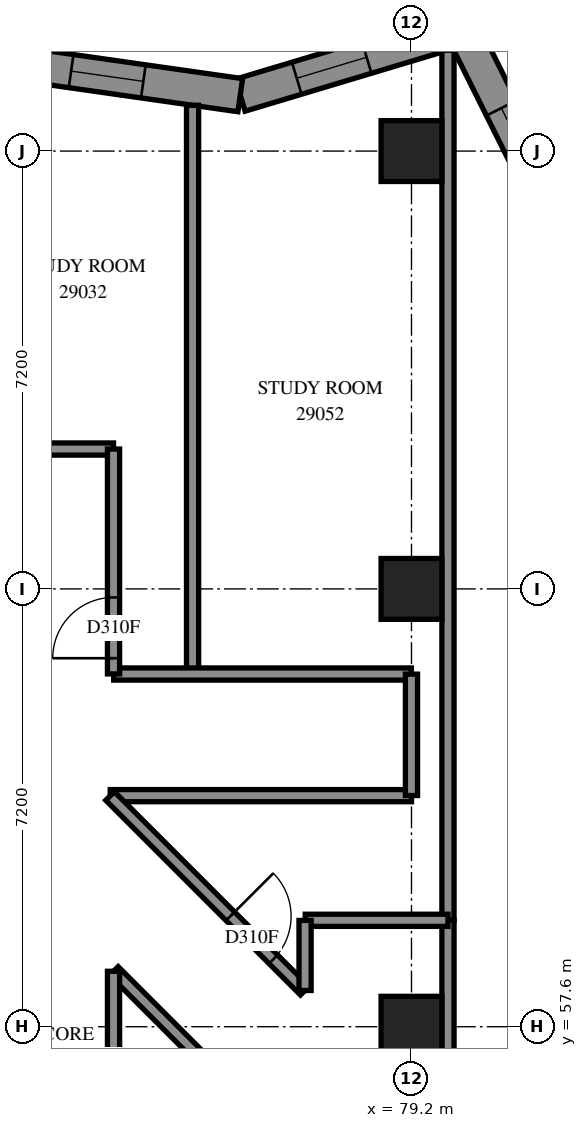
"""IFC4 building model, lengths in metres.
Left out: names, types, materials, properties, quantities, classifications, styles, units other than length and angle.
Written with IfcOpenShell. Run it as: python <this file> out.ifc"""

import sys

from ifc_helpers import new_model, si_unit, direction, frame, frame_2d, origin, origin_2d, place, context, subcontext, project, spatial, polyline, rectangle, outline, extrude, element, fill, save


model = new_model("IFC4")
c1 = context("Model", 3, precision=1e-05, world=origin(), true_north=direction((0.0, 1.0)))
c2 = subcontext(c1, "Body", "Model", "MODEL_VIEW")
j1 = project(units=[si_unit("LENGTHUNIT", "METRE"), si_unit("PLANEANGLEUNIT", "RADIAN")], contexts=[c1])
p1 = place(None, origin())
s1 = spatial("IfcSite", under=j1, at=p1, CompositionType="ELEMENT")
p2 = place(p1, origin())
s2 = spatial("IfcBuilding", under=s1, at=p2, CompositionType="ELEMENT")
p3 = place(p2, frame((0.0, 0.0, 108.4)))
s3 = spatial("IfcBuildingStorey", under=s2, at=p3, CompositionType="ELEMENT", Elevation=108.4)
for number, where, z_axis, x_axis in (
    (1, (79.2, 57.6, 0.0), (0.0, 0.0, 1.0), (1.0, 0.0, 0.0)),
    (2, (79.2, 64.8, 0.0), (0.0, 0.0, 1.0), (1.0, 0.0, 0.0)),
    (3, (79.2, 72.0, 0.0), (0.0, 0.0, 1.0), (1.0, 0.0, 0.0)),
):
    element("IfcColumn", number, at=place(p3, frame(where, z_axis=z_axis, x_axis=x_axis)), inside=s3, PredefinedType="COLUMN", context=c2, shape_type="SweptSolid", body=[
        extrude(rectangle(XDim=1.0, YDim=1.0, at=origin_2d()), origin(), (0.0, 0.0, 1.0), 3.1),
    ])
p4 = place(p3, frame((76.372, 49.373, -0.3), z_axis=(0.0, 0.0, 1.0), x_axis=(0.7071067812, 0.7071067812, 0.0)))
e4 = element("IfcWall", 4, at=p4, inside=s3, PredefinedType="SHEAR", context=c2, shape_type="SweptSolid", body=[
    extrude(rectangle(XDim=14.4, YDim=0.8, at=frame_2d((7.2, 0.0))), origin(), (0.0, 0.0, 1.0), 2.7),
])
p5 = place(p4, frame((4.55, 0.0, 0.3)))
e5 = element("IfcOpeningElement", 5, at=p5, cuts=e4, PredefinedType="OPENING", context=c2, shape_type="SweptSolid", body=[
    extrude(rectangle(XDim=1.1, YDim=2.1, at=frame_2d((0.55, 1.05))), frame((0.0, 0.41, 0.0), z_axis=(0.0, -1.0, 0.0), x_axis=(1.0, 0.0, 0.0)), (0.0, 0.0, 1.0), 0.82),
])
p6 = place(p4, frame((11.35, 0.0, 0.3)))
e6 = element("IfcOpeningElement", 6, at=p6, cuts=e4, PredefinedType="OPENING", context=c2, shape_type="SweptSolid", body=[
    extrude(rectangle(XDim=1.1, YDim=2.1, at=frame_2d((0.55, 1.05))), frame((0.0, 0.41, 0.0), z_axis=(0.0, -1.0, 0.0), x_axis=(1.0, 0.0, 0.0)), (0.0, 0.0, 1.0), 0.82),
])
p7 = place(p3, frame((81.559, 70.939, 0.0), z_axis=(0.0, 0.0, 1.0), x_axis=(-0.4461299754, 0.894968181, 0.0)))
e7 = element("IfcWall", 7, at=p7, inside=s3, PredefinedType="SOLIDWALL", context=c2, shape_type="SweptSolid", body=[
    extrude(outline(polyline([(0.067, -0.275), (3.666, -0.275), (3.202, 0.275), (-0.067, 0.275), (0.067, -0.275)])), origin(), (0.0, 0.0, 1.0), 3.1),
])
p8 = place(p7, frame((0.775, 0.0, 0.5)))
e8 = element("IfcOpeningElement", 8, at=p8, cuts=e7, PredefinedType="OPENING", context=c2, shape_type="SweptSolid", body=[
    extrude(rectangle(XDim=1.2, YDim=2.45, at=frame_2d((0.6, 1.225))), frame((0.0, 0.285, 0.0), z_axis=(0.0, -1.0, 0.0), x_axis=(1.0, 0.0, 0.0)), (0.0, 0.0, 1.0), 0.57),
])
p9 = place(p3, frame((80.027, 74.012, 0.0), z_axis=(0.0, 0.0, 1.0), x_axis=(-0.9578284561, -0.2873406493, 0.0)))
e9 = element("IfcWall", 9, at=p9, inside=s3, PredefinedType="SOLIDWALL", context=c2, shape_type="SweptSolid", body=[
    extrude(outline(polyline([(-0.232, -0.275), (3.743, -0.275), (3.864, 0.275), (0.232, 0.275), (-0.232, -0.275)])), origin(), (0.0, 0.0, 1.0), 3.1),
])
p10 = place(p9, frame((1.634, 0.0, 0.5)))
e10 = element("IfcOpeningElement", 10, at=p10, cuts=e9, PredefinedType="OPENING", context=c2, shape_type="SweptSolid", body=[
    extrude(rectangle(XDim=1.2, YDim=2.45, at=frame_2d((0.6, 1.225))), frame((0.0, 0.285, 0.0), z_axis=(0.0, -1.0, 0.0), x_axis=(1.0, 0.0, 0.0)), (0.0, 0.0, 1.0), 0.57),
])
p11 = place(p3, frame((76.384, 72.919, 0.0), z_axis=(0.0, 0.0, 1.0), x_axis=(-0.9900171381, 0.1409470338, 0.0)))
e11 = element("IfcWall", 11, at=p11, inside=s3, PredefinedType="SOLIDWALL", context=c2, shape_type="SweptSolid", body=[
    extrude(outline(polyline([(0.06, -0.275), (3.906, -0.275), (3.828, 0.275), (-0.06, 0.275), (0.06, -0.275)])), origin(), (0.0, 0.0, 1.0), 3.1),
])
p12 = place(p11, frame((1.61, 0.0, 0.5)))
e12 = element("IfcOpeningElement", 12, at=p12, cuts=e11, PredefinedType="OPENING", context=c2, shape_type="SweptSolid", body=[
    extrude(rectangle(XDim=1.2, YDim=2.45, at=frame_2d((0.6, 1.225))), frame((0.0, 0.285, 0.0), z_axis=(0.0, -1.0, 0.0), x_axis=(1.0, 0.0, 0.0)), (0.0, 0.0, 1.0), 0.57),
])
p13 = place(p3, frame((55.3, 67.1, 0.0), z_axis=(0.0, 0.0, 1.0), x_axis=(1.0, 0.0, 0.0)))
e13 = element("IfcWall", 13, at=p13, inside=s3, PredefinedType="PARTITIONING", context=c2, shape_type="SweptSolid", body=[
    extrude(rectangle(XDim=19.0, YDim=0.2, at=frame_2d((9.5, 0.0))), origin(), (0.0, 0.0, 1.0), 3.1),
])
p14 = place(p13, frame((6.199, 0.0, 0.0)))
e14 = element("IfcOpeningElement", 14, at=p14, cuts=e13, PredefinedType="OPENING", context=c2, shape_type="SweptSolid", body=[
    extrude(rectangle(XDim=0.9, YDim=2.1, at=frame_2d((0.45, 1.05))), frame((0.0, 0.11, 0.0), z_axis=(0.0, -1.0, 0.0), x_axis=(1.0, 0.0, 0.0)), (0.0, 0.0, 1.0), 0.22),
])
p15 = place(p13, frame((13.399, 0.0, 0.0)))
e15 = element("IfcOpeningElement", 15, at=p15, cuts=e13, PredefinedType="OPENING", context=c2, shape_type="SweptSolid", body=[
    extrude(rectangle(XDim=0.9, YDim=2.1, at=frame_2d((0.45, 1.05))), frame((0.0, 0.11, 0.0), z_axis=(0.0, -1.0, 0.0), x_axis=(1.0, 0.0, 0.0)), (0.0, 0.0, 1.0), 0.22),
])
p16 = place(p3, frame((79.8, 59.35, 0.0), z_axis=(0.0, 0.0, 1.0), x_axis=(0.0, 1.0, 0.0)))
e16 = element("IfcWall", 16, at=p16, inside=s3, PredefinedType="PARTITIONING", context=c2, shape_type="SweptSolid", body=[
    extrude(rectangle(XDim=14.307, YDim=0.2, at=frame_2d((7.153, 0.0))), origin(), (0.0, 0.0, 1.0), 3.1),
])
p17 = place(p3, frame((75.6, 63.4, 0.0), z_axis=(0.0, 0.0, 1.0), x_axis=(0.0, 1.0, 0.0)))
e17 = element("IfcWall", 17, at=p17, inside=s3, PredefinedType="PARTITIONING", context=c2, shape_type="SweptSolid", body=[
    extrude(rectangle(XDim=9.353, YDim=0.2, at=frame_2d((4.676, 0.0))), origin(), (0.0, 0.0, 1.0), 3.1),
])
p18 = place(p3, frame((74.246, 61.4, 0.0), z_axis=(0.0, 0.0, 1.0), x_axis=(1.0, 0.0, 0.0)))
e18 = element("IfcWall", 18, at=p18, inside=s3, PredefinedType="PARTITIONING", context=c2, shape_type="SweptSolid", body=[
    extrude(rectangle(XDim=4.954, YDim=0.2, at=frame_2d((2.477, 0.0))), origin(), (0.0, 0.0, 1.0), 3.1),
])
p19 = place(p3, frame((74.302, 63.4, 0.0), z_axis=(0.0, 0.0, 1.0), x_axis=(1.0, 0.0, 0.0)))
e19 = element("IfcWall", 19, at=p19, inside=s3, PredefinedType="PARTITIONING", context=c2, shape_type="SweptSolid", body=[
    extrude(rectangle(XDim=4.896, YDim=0.2, at=frame_2d((2.448, 0.0))), origin(), (0.0, 0.0, 1.0), 3.1),
])
p20 = place(p3, frame((74.243, 61.395, 0.0), z_axis=(0.0, 0.0, 1.0), x_axis=(0.7071067812, -0.7071067812, 0.0)))
e20 = element("IfcWall", 20, at=p20, inside=s3, PredefinedType="PARTITIONING", context=c2, shape_type="SweptSolid", body=[
    extrude(rectangle(XDim=4.528, YDim=0.2, at=frame_2d((2.264, 0.0))), origin(), (0.0, 0.0, 1.0), 3.1),
])
p21 = place(p20, frame((2.797, 0.0, 0.0)))
e21 = element("IfcOpeningElement", 21, at=p21, cuts=e20, PredefinedType="OPENING", context=c2, shape_type="SweptSolid", body=[
    extrude(rectangle(XDim=1.0, YDim=2.1, at=frame_2d((0.5, 1.05))), frame((0.0, 0.11, 0.0), z_axis=(0.0, -1.0, 0.0), x_axis=(1.0, 0.0, 0.0)), (0.0, 0.0, 1.0), 0.22),
])
p22 = place(p3, frame((74.3, 63.402, 0.0), z_axis=(0.0, 0.0, 1.0), x_axis=(0.0, 1.0, 0.0)))
e22 = element("IfcWall", 22, at=p22, inside=s3, PredefinedType="PARTITIONING", context=c2, shape_type="SweptSolid", body=[
    extrude(rectangle(XDim=3.698, YDim=0.2, at=frame_2d((1.849, 0.0))), origin(), (0.0, 0.0, 1.0), 3.1),
])
p23 = place(p22, frame((0.258, 0.0, 0.0)))
e23 = element("IfcOpeningElement", 23, at=p23, cuts=e22, PredefinedType="OPENING", context=c2, shape_type="SweptSolid", body=[
    extrude(rectangle(XDim=1.0, YDim=2.1, at=frame_2d((0.5, 1.05))), frame((0.0, 0.11, 0.0), z_axis=(0.0, -1.0, 0.0), x_axis=(1.0, 0.0, 0.0)), (0.0, 0.0, 1.0), 0.22),
])
p24 = place(p3, frame((79.8, 55.85, 0.0), z_axis=(0.0, 0.0, 1.0), x_axis=(0.0, 1.0, 0.0)))
e24 = element("IfcWall", 24, at=p24, inside=s3, PredefinedType="PARTITIONING", context=c2, shape_type="SweptSolid", body=[
    extrude(rectangle(XDim=3.5, YDim=0.2, at=frame_2d((1.75, 0.0))), origin(), (0.0, 0.0, 1.0), 3.1),
])
p25 = place(p3, frame((74.305, 58.517, 0.0), z_axis=(0.0, 0.0, 1.0), x_axis=(0.7071067812, -0.7071067812, 0.0)))
e25 = element("IfcWall", 25, at=p25, inside=s3, PredefinedType="PARTITIONING", context=c2, shape_type="SweptSolid", body=[
    extrude(rectangle(XDim=3.27, YDim=0.2, at=frame_2d((1.635, 0.0))), origin(), (0.0, 0.0, 1.0), 3.1),
])
p26 = place(p3, frame((77.452, 59.35, 0.0), z_axis=(0.0, 0.0, 1.0), x_axis=(1.0, 0.0, 0.0)))
e26 = element("IfcWall", 26, at=p26, inside=s3, PredefinedType="PARTITIONING", context=c2, shape_type="SweptSolid", body=[
    extrude(rectangle(XDim=2.348, YDim=0.2, at=frame_2d((1.174, 0.0))), origin(), (0.0, 0.0, 1.0), 3.1),
])
p27 = place(p3, frame((74.3, 56.202, 0.0), z_axis=(0.0, 0.0, 1.0), x_axis=(0.0, 1.0, 0.0)))
e27 = element("IfcWall", 27, at=p27, inside=s3, PredefinedType="PARTITIONING", context=c2, shape_type="SweptSolid", body=[
    extrude(rectangle(XDim=2.31, YDim=0.2, at=frame_2d((1.155, 0.0))), origin(), (0.0, 0.0, 1.0), 3.1),
])
p28 = place(p3, frame((79.2, 61.402, 0.0), z_axis=(0.0, 0.0, 1.0), x_axis=(0.0, 1.0, 0.0)))
e28 = element("IfcWall", 28, at=p28, inside=s3, PredefinedType="PARTITIONING", context=c2, shape_type="SweptSolid", body=[
    extrude(rectangle(XDim=1.996, YDim=0.2, at=frame_2d((0.998, 0.0))), origin(), (0.0, 0.0, 1.0), 3.1),
])
p29 = place(p3, frame((77.45, 58.196, 0.0), z_axis=(0.0, 0.0, 1.0), x_axis=(0.0, 1.0, 0.0)))
e29 = element("IfcWall", 29, at=p29, inside=s3, PredefinedType="PARTITIONING", context=c2, shape_type="SweptSolid", body=[
    extrude(rectangle(XDim=1.152, YDim=0.2, at=frame_2d((0.576, 0.0))), origin(), (0.0, 0.0, 1.0), 3.1),
])
p30 = place(p8, origin())
e30 = element("IfcWindow", 30, at=p30, inside=s3, PartitioningType="SINGLE_PANEL", PredefinedType="WINDOW", context=c2, shape_type="SweptSolid", body=[
    extrude(rectangle(XDim=1.2, YDim=2.45, at=frame_2d((0.6, 1.225))), frame((0.0, 0.155, 0.0), z_axis=(0.0, -1.0, 0.0), x_axis=(1.0, 0.0, 0.0)), (0.0, 0.0, 1.0), 0.06),
])
fill(e8, e30)
p31 = place(p10, origin())
e31 = element("IfcWindow", 31, at=p31, inside=s3, PartitioningType="SINGLE_PANEL", PredefinedType="WINDOW", context=c2, shape_type="SweptSolid", body=[
    extrude(rectangle(XDim=1.2, YDim=2.45, at=frame_2d((0.6, 1.225))), frame((0.0, 0.155, 0.0), z_axis=(0.0, -1.0, 0.0), x_axis=(1.0, 0.0, 0.0)), (0.0, 0.0, 1.0), 0.06),
])
fill(e10, e31)
p32 = place(p12, origin())
e32 = element("IfcWindow", 32, at=p32, inside=s3, PartitioningType="SINGLE_PANEL", PredefinedType="WINDOW", context=c2, shape_type="SweptSolid", body=[
    extrude(rectangle(XDim=1.2, YDim=2.45, at=frame_2d((0.6, 1.225))), frame((0.0, 0.155, 0.0), z_axis=(0.0, -1.0, 0.0), x_axis=(1.0, 0.0, 0.0)), (0.0, 0.0, 1.0), 0.06),
])
fill(e12, e32)
p33 = place(p23, origin())
e33 = element("IfcDoor", 33, at=p33, inside=s3, OperationType="SINGLE_SWING_RIGHT", PredefinedType="DOOR", context=c2, shape_type="SweptSolid", body=[
    extrude(rectangle(XDim=1.0, YDim=2.1, at=frame_2d((0.5, 1.05))), frame((0.0, 0.025, 0.0), z_axis=(0.0, -1.0, 0.0), x_axis=(1.0, 0.0, 0.0)), (0.0, 0.0, 1.0), 0.05),
])
fill(e23, e33)
p34 = place(p21, origin())
e34 = element("IfcDoor", 34, at=p34, inside=s3, OperationType="SINGLE_SWING_LEFT", PredefinedType="DOOR", context=c2, shape_type="SweptSolid", body=[
    extrude(rectangle(XDim=1.0, YDim=2.1, at=frame_2d((0.5, 1.05))), frame((0.0, 0.025, 0.0), z_axis=(0.0, -1.0, 0.0), x_axis=(1.0, 0.0, 0.0)), (0.0, 0.0, 1.0), 0.05),
])
fill(e21, e34)
save(model, sys.argv[1])
